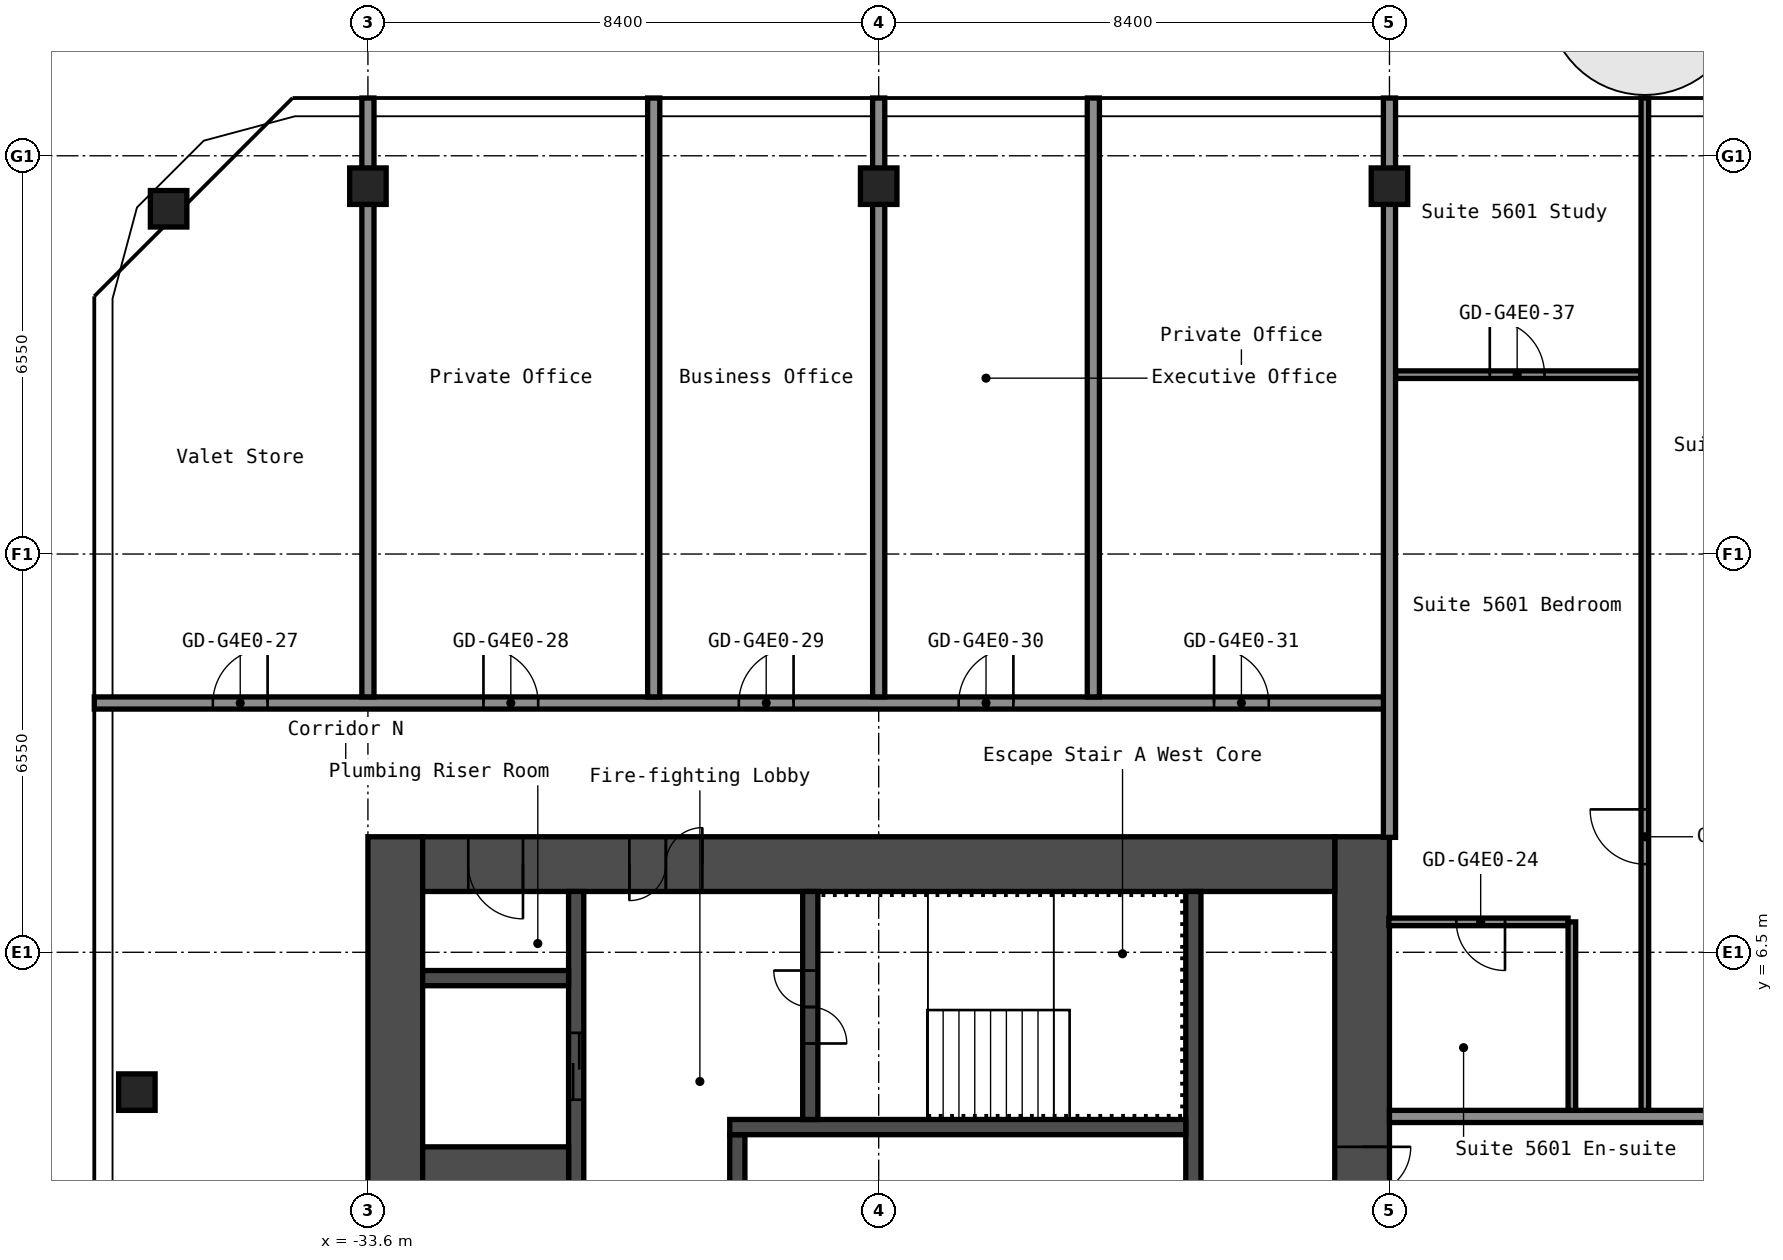
"""IFC4 building model, lengths in metres.
Left out: names, types, materials, properties, quantities, classifications, styles, units other than length and angle.
Written with IfcOpenShell. Run it as: python <this file> out.ifc"""

import sys

from ifc_helpers import new_model, si_unit, direction, frame, frame_2d, origin, origin_2d, place, context, subcontext, project, spatial, rectangle, hollow_rectangle, extrude, element, fill, save


model = new_model("IFC4")
c1 = context("Model", 3, precision=1e-05, world=origin(), true_north=direction((0.0, 1.0)))
c2 = subcontext(c1, "Body", "Model", "MODEL_VIEW")
j1 = project(units=[si_unit("LENGTHUNIT", "METRE"), si_unit("PLANEANGLEUNIT", "RADIAN")], contexts=[c1])
p1 = place(None, origin())
s1 = spatial("IfcSite", under=j1, at=p1, CompositionType="ELEMENT")
p2 = place(p1, origin())
s2 = spatial("IfcBuilding", under=s1, at=p2, CompositionType="ELEMENT")
p3 = place(p2, frame((0.0, 0.0, 199.4)))
s3 = spatial("IfcBuildingStorey", under=s2, at=p3, CompositionType="ELEMENT", Elevation=199.4)
for number, where, z_axis, x_axis in (
    (1, (-37.4, 4.2, 0.0), (0.0, 0.0, 1.0), (1.0, 0.0, 0.0)),
    (2, (-36.878, 18.729, 0.0), (0.0, 0.0, 1.0), (1.0, 0.0, 0.0)),
    (3, (-33.6, 19.1, 0.0), (0.0, 0.0, 1.0), (1.0, 0.0, 0.0)),
    (4, (-25.2, 19.1, 0.0), (0.0, 0.0, 1.0), (1.0, 0.0, 0.0)),
    (5, (-16.8, 19.1, 0.0), (0.0, 0.0, 1.0), (1.0, 0.0, 0.0)),
):
    element("IfcColumn", number, at=place(p3, frame(where, z_axis=z_axis, x_axis=x_axis)), inside=s3, PredefinedType="COLUMN", context=c2, shape_type="SweptSolid", body=[
        extrude(hollow_rectangle(XDim=0.6, YDim=0.6, WallThickness=0.025, InnerFilletRadius=0.038, OuterFilletRadius=0.062, at=origin_2d()), origin(), (0.0, 0.0, 1.0), 2.75),
    ])
p4 = place(p3, frame((-17.25, -8.4, 0.0), z_axis=(0.0, 0.0, 1.0), x_axis=(0.0, 1.0, 0.0)))
e6 = element("IfcWall", 6, at=p4, inside=s3, PredefinedType="SHEAR", context=c2, shape_type="SweptSolid", body=[
    extrude(rectangle(XDim=16.8, YDim=0.9, at=frame_2d((8.4, 0.0))), origin(), (0.0, 0.0, 1.0), 2.75),
])
p5 = place(p4, frame((10.1, 0.0, 0.0)))
e7 = element("IfcOpeningElement", 7, at=p5, cuts=e6, PredefinedType="OPENING", context=c2, shape_type="SweptSolid", body=[
    extrude(rectangle(XDim=1.6, YDim=2.1, at=frame_2d((0.8, 1.05))), frame((0.0, 0.46, 0.0), z_axis=(0.0, -1.0, 0.0), x_axis=(1.0, 0.0, 0.0)), (0.0, 0.0, 1.0), 0.92),
])
p6 = place(p3, frame((-33.15, -8.4, 0.0), z_axis=(0.0, 0.0, 1.0), x_axis=(0.0, 1.0, 0.0)))
e8 = element("IfcWall", 8, at=p6, inside=s3, PredefinedType="SHEAR", context=c2, shape_type="SweptSolid", body=[
    extrude(rectangle(XDim=16.8, YDim=0.9, at=frame_2d((8.4, 0.0))), origin(), (0.0, 0.0, 1.0), 2.75),
])
p7 = place(p3, frame((-32.7, 7.95, 0.0), z_axis=(0.0, 0.0, 1.0), x_axis=(1.0, 0.0, 0.0)))
e9 = element("IfcWall", 9, at=p7, inside=s3, PredefinedType="SHEAR", context=c2, shape_type="SweptSolid", body=[
    extrude(rectangle(XDim=15.0, YDim=0.9, at=frame_2d((7.5, 0.0))), origin(), (0.0, 0.0, 1.0), 2.75),
])
p8 = place(p7, frame((3.4, 0.0, 0.0)))
e10 = element("IfcOpeningElement", 10, at=p8, cuts=e9, PredefinedType="OPENING", context=c2, shape_type="SweptSolid", body=[
    extrude(rectangle(XDim=1.2, YDim=2.1, at=frame_2d((0.6, 1.05))), frame((0.0, 0.46, 0.0), z_axis=(0.0, -1.0, 0.0), x_axis=(1.0, 0.0, 0.0)), (0.0, 0.0, 1.0), 0.92),
])
p9 = place(p7, frame((0.75, 0.0, 0.0)))
e11 = element("IfcOpeningElement", 11, at=p9, cuts=e9, PredefinedType="OPENING", context=c2, shape_type="SweptSolid", body=[
    extrude(rectangle(XDim=0.9, YDim=2.1, at=frame_2d((0.45, 1.05))), frame((0.0, 0.46, 0.0), z_axis=(0.0, -1.0, 0.0), x_axis=(1.0, 0.0, 0.0)), (0.0, 0.0, 1.0), 0.92),
])
p10 = place(p3, frame((-20.025, 1.2, 0.0), z_axis=(0.0, 0.0, 1.0), x_axis=(0.0, 1.0, 0.0)))
e12 = element("IfcWall", 12, at=p10, inside=s3, PredefinedType="SHEAR", context=c2, shape_type="SweptSolid", body=[
    extrude(rectangle(XDim=6.3, YDim=0.25, at=frame_2d((3.15, 0.0))), origin(), (0.0, 0.0, 1.0), 2.75),
])
p11 = place(p3, frame((-27.525, 1.45, 0.0), z_axis=(0.0, 0.0, 1.0), x_axis=(0.0, 1.0, 0.0)))
e13 = element("IfcWall", 13, at=p11, inside=s3, PredefinedType="SHEAR", context=c2, shape_type="SweptSolid", body=[
    extrude(rectangle(XDim=2.05, YDim=0.25, at=frame_2d((1.025, 0.0))), origin(), (0.0, 0.0, 1.0), 2.75),
])
p12 = place(p3, frame((-27.65, 3.625, 0.0), z_axis=(0.0, 0.0, 1.0), x_axis=(1.0, 0.0, 0.0)))
e14 = element("IfcWall", 14, at=p12, inside=s3, PredefinedType="SHEAR", context=c2, shape_type="SweptSolid", body=[
    extrude(rectangle(XDim=7.5, YDim=0.25, at=frame_2d((3.75, 0.0))), origin(), (0.0, 0.0, 1.0), 2.75),
])
p13 = place(p3, frame((-26.325, 3.75, 0.0), z_axis=(0.0, 0.0, 1.0), x_axis=(0.0, 1.0, 0.0)))
e15 = element("IfcWall", 15, at=p13, inside=s3, PredefinedType="SHEAR", context=c2, shape_type="SweptSolid", body=[
    extrude(rectangle(XDim=3.75, YDim=0.25, at=frame_2d((1.875, 0.0))), origin(), (0.0, 0.0, 1.0), 2.75),
])
p14 = place(p13, frame((1.25, 0.0, 0.0)))
e16 = element("IfcOpeningElement", 16, at=p14, cuts=e15, PredefinedType="OPENING", context=c2, shape_type="SweptSolid", body=[
    extrude(rectangle(XDim=1.2, YDim=2.1, at=frame_2d((0.6, 1.05))), frame((0.0, 0.135, 0.0), z_axis=(0.0, -1.0, 0.0), x_axis=(1.0, 0.0, 0.0)), (0.0, 0.0, 1.0), 0.27),
])
p15 = place(p3, frame((-30.175, 1.45, 0.0), z_axis=(0.0, 0.0, 1.0), x_axis=(0.0, 1.0, 0.0)))
e17 = element("IfcWall", 17, at=p15, inside=s3, PredefinedType="SHEAR", context=c2, shape_type="SweptSolid", body=[
    extrude(rectangle(XDim=6.05, YDim=0.25, at=frame_2d((3.025, 0.0))), origin(), (0.0, 0.0, 1.0), 2.75),
])
p16 = place(p15, frame((2.625, 0.0, 0.0)))
e18 = element("IfcOpeningElement", 18, at=p16, cuts=e17, PredefinedType="OPENING", context=c2, shape_type="SweptSolid", body=[
    extrude(rectangle(XDim=1.1, YDim=2.1, at=frame_2d((0.55, 1.05))), frame((0.0, 0.135, 0.0), z_axis=(0.0, -1.0, 0.0), x_axis=(1.0, 0.0, 0.0)), (0.0, 0.0, 1.0), 0.27),
])
p17 = place(p3, frame((-32.7, 2.375, 0.0), z_axis=(0.0, 0.0, 1.0), x_axis=(1.0, 0.0, 0.0)))
e19 = element("IfcWall", 19, at=p17, inside=s3, PredefinedType="SHEAR", context=c2, shape_type="SweptSolid", body=[
    extrude(rectangle(XDim=2.4, YDim=1.85, at=frame_2d((1.2, 0.0))), origin(), (0.0, 0.0, 1.0), 2.75),
])
p18 = place(p3, frame((-32.7, 6.075, 0.0), z_axis=(0.0, 0.0, 1.0), x_axis=(1.0, 0.0, 0.0)))
e20 = element("IfcWall", 20, at=p18, inside=s3, PredefinedType="SHEAR", context=c2, shape_type="SweptSolid", body=[
    extrude(rectangle(XDim=2.4, YDim=0.25, at=frame_2d((1.2, 0.0))), origin(), (0.0, 0.0, 1.0), 2.75),
])
p19 = place(p3, frame((-16.8, 3.8, 0.0), z_axis=(0.0, 0.0, 1.0), x_axis=(1.0, 0.0, 0.0)))
e21 = element("IfcWall", 21, at=p19, inside=s3, PredefinedType="PARTITIONING", context=c2, shape_type="SweptSolid", body=[
    extrude(rectangle(XDim=33.6, YDim=0.2, at=frame_2d((16.8, 0.0))), origin(), (0.0, 0.0, 1.0), 2.75),
])
p20 = place(p19, frame((5.8, 0.0, 0.0)))
e22 = element("IfcOpeningElement", 22, at=p20, cuts=e21, PredefinedType="OPENING", context=c2, shape_type="SweptSolid", body=[
    extrude(rectangle(XDim=1.0, YDim=2.1, at=frame_2d((0.5, 1.05))), frame((0.0, 0.11, 0.0), z_axis=(0.0, -1.0, 0.0), x_axis=(1.0, 0.0, 0.0)), (0.0, 0.0, 1.0), 0.22),
])
p21 = place(p19, frame((10.3, 0.0, 0.0)))
e23 = element("IfcOpeningElement", 23, at=p21, cuts=e21, PredefinedType="OPENING", context=c2, shape_type="SweptSolid", body=[
    extrude(rectangle(XDim=1.0, YDim=2.1, at=frame_2d((0.5, 1.05))), frame((0.0, 0.11, 0.0), z_axis=(0.0, -1.0, 0.0), x_axis=(1.0, 0.0, 0.0)), (0.0, 0.0, 1.0), 0.22),
])
p22 = place(p19, frame((22.6, 0.0, 0.0)))
e24 = element("IfcOpeningElement", 24, at=p22, cuts=e21, PredefinedType="OPENING", context=c2, shape_type="SweptSolid", body=[
    extrude(rectangle(XDim=1.0, YDim=2.1, at=frame_2d((0.5, 1.05))), frame((0.0, 0.11, 0.0), z_axis=(0.0, -1.0, 0.0), x_axis=(1.0, 0.0, 0.0)), (0.0, 0.0, 1.0), 0.22),
])
p23 = place(p19, frame((31.0, 0.0, 0.0)))
e25 = element("IfcOpeningElement", 25, at=p23, cuts=e21, PredefinedType="OPENING", context=c2, shape_type="SweptSolid", body=[
    extrude(rectangle(XDim=1.0, YDim=2.1, at=frame_2d((0.5, 1.05))), frame((0.0, 0.11, 0.0), z_axis=(0.0, -1.0, 0.0), x_axis=(1.0, 0.0, 0.0)), (0.0, 0.0, 1.0), 0.22),
])
p24 = place(p3, frame((-16.81, 7.0, 0.0), z_axis=(0.0, 0.0, 1.0), x_axis=(1.0, 0.0, 0.0)))
e26 = element("IfcWall", 26, at=p24, inside=s3, PredefinedType="PARTITIONING", context=c2, shape_type="SweptSolid", body=[
    extrude(rectangle(XDim=2.948, YDim=0.125, at=frame_2d((1.474, 0.0))), origin(), (0.0, 0.0, 1.0), 2.75),
])
p25 = place(p24, frame((1.11, 0.0, 0.0)))
e27 = element("IfcOpeningElement", 27, at=p25, cuts=e26, PredefinedType="OPENING", context=c2, shape_type="SweptSolid", body=[
    extrude(rectangle(XDim=0.8, YDim=2.1, at=frame_2d((0.4, 1.05))), frame((0.0, 0.073, 0.0), z_axis=(0.0, -1.0, 0.0), x_axis=(1.0, 0.0, 0.0)), (0.0, 0.0, 1.0), 0.145),
])
p26 = place(p3, frame((-38.1, 10.6, 0.0), z_axis=(0.0, 0.0, 1.0), x_axis=(1.0, 0.0, 0.0)))
e28 = element("IfcWall", 28, at=p26, inside=s3, PredefinedType="PARTITIONING", context=c2, shape_type="SweptSolid", body=[
    extrude(rectangle(XDim=21.3, YDim=0.2, at=frame_2d((10.65, 0.0))), origin(), (0.0, 0.0, 1.0), 2.75),
])
p27 = place(p26, frame((1.95, 0.0, 0.0)))
e29 = element("IfcOpeningElement", 29, at=p27, cuts=e28, PredefinedType="OPENING", context=c2, shape_type="SweptSolid", body=[
    extrude(rectangle(XDim=0.9, YDim=2.1, at=frame_2d((0.45, 1.05))), frame((0.0, 0.11, 0.0), z_axis=(0.0, -1.0, 0.0), x_axis=(1.0, 0.0, 0.0)), (0.0, 0.0, 1.0), 0.22),
])
p28 = place(p26, frame((6.4, 0.0, 0.0)))
e30 = element("IfcOpeningElement", 30, at=p28, cuts=e28, PredefinedType="OPENING", context=c2, shape_type="SweptSolid", body=[
    extrude(rectangle(XDim=0.9, YDim=2.1, at=frame_2d((0.45, 1.05))), frame((0.0, 0.11, 0.0), z_axis=(0.0, -1.0, 0.0), x_axis=(1.0, 0.0, 0.0)), (0.0, 0.0, 1.0), 0.22),
])
p29 = place(p26, frame((10.6, 0.0, 0.0)))
e31 = element("IfcOpeningElement", 31, at=p29, cuts=e28, PredefinedType="OPENING", context=c2, shape_type="SweptSolid", body=[
    extrude(rectangle(XDim=0.9, YDim=2.1, at=frame_2d((0.45, 1.05))), frame((0.0, 0.11, 0.0), z_axis=(0.0, -1.0, 0.0), x_axis=(1.0, 0.0, 0.0)), (0.0, 0.0, 1.0), 0.22),
])
p30 = place(p26, frame((14.215, 0.0, 0.0)))
e32 = element("IfcOpeningElement", 32, at=p30, cuts=e28, PredefinedType="OPENING", context=c2, shape_type="SweptSolid", body=[
    extrude(rectangle(XDim=0.9, YDim=2.1, at=frame_2d((0.45, 1.05))), frame((0.0, 0.11, 0.0), z_axis=(0.0, -1.0, 0.0), x_axis=(1.0, 0.0, 0.0)), (0.0, 0.0, 1.0), 0.22),
])
p31 = place(p26, frame((18.415, 0.0, 0.0)))
e33 = element("IfcOpeningElement", 33, at=p31, cuts=e28, PredefinedType="OPENING", context=c2, shape_type="SweptSolid", body=[
    extrude(rectangle(XDim=0.9, YDim=2.1, at=frame_2d((0.45, 1.05))), frame((0.0, 0.11, 0.0), z_axis=(0.0, -1.0, 0.0), x_axis=(1.0, 0.0, 0.0)), (0.0, 0.0, 1.0), 0.22),
])
p32 = place(p3, frame((-16.7, 16.0, 0.0), z_axis=(0.0, 0.0, 1.0), x_axis=(1.0, 0.0, 0.0)))
e34 = element("IfcWall", 34, at=p32, inside=s3, PredefinedType="PARTITIONING", context=c2, shape_type="SweptSolid", body=[
    extrude(rectangle(XDim=4.037, YDim=0.125, at=frame_2d((2.019, 0.0))), origin(), (0.0, 0.0, 1.0), 2.75),
])
p33 = place(p32, frame((1.55, 0.0, 0.0)))
e35 = element("IfcOpeningElement", 35, at=p33, cuts=e34, PredefinedType="OPENING", context=c2, shape_type="SweptSolid", body=[
    extrude(rectangle(XDim=0.9, YDim=2.1, at=frame_2d((0.45, 1.05))), frame((0.0, 0.073, 0.0), z_axis=(0.0, -1.0, 0.0), x_axis=(1.0, 0.0, 0.0)), (0.0, 0.0, 1.0), 0.145),
])
for number, where, z_axis, x_axis in (
    (36, (-33.6, 10.7, 0.0), (0.0, 0.0, 1.0), (0.0, 1.0, 0.0)),
    (37, (-28.9, 10.7, 0.0), (0.0, 0.0, 1.0), (0.0, 1.0, 0.0)),
    (38, (-25.2, 10.7, 0.0), (0.0, 0.0, 1.0), (0.0, 1.0, 0.0)),
    (39, (-21.67, 10.7, 0.0), (0.0, 0.0, 1.0), (0.0, 1.0, 0.0)),
):
    element("IfcWall", number, at=place(p3, frame(where, z_axis=z_axis, x_axis=x_axis)), inside=s3, PredefinedType="PARTITIONING", context=c2, shape_type="SweptSolid", body=[
        extrude(rectangle(XDim=9.85, YDim=0.2, at=frame_2d((4.925, 0.0))), origin(), (0.0, 0.0, 1.0), 2.75),
    ])
p34 = place(p3, frame((-16.8, 8.39, 0.0), z_axis=(0.0, 0.0, 1.0), x_axis=(0.0, 1.0, 0.0)))
e40 = element("IfcWall", 40, at=p34, inside=s3, PredefinedType="PARTITIONING", context=c2, shape_type="SweptSolid", body=[
    extrude(rectangle(XDim=12.16, YDim=0.2, at=frame_2d((6.08, 0.0))), origin(), (0.0, 0.0, 1.0), 2.75),
])
p35 = place(p3, frame((-13.8, 3.9, 0.0), z_axis=(0.0, 0.0, 1.0), x_axis=(0.0, 1.0, 0.0)))
e41 = element("IfcWall", 41, at=p35, inside=s3, PredefinedType="PARTITIONING", context=c2, shape_type="SweptSolid", body=[
    extrude(rectangle(XDim=3.1, YDim=0.125, at=frame_2d((1.55, 0.0))), origin(), (0.0, 0.0, 1.0), 2.75),
])
p36 = place(p3, frame((-12.6, 3.9, 0.0), z_axis=(0.0, 0.0, 1.0), x_axis=(0.0, 1.0, 0.0)))
e42 = element("IfcWall", 42, at=p36, inside=s3, PredefinedType="PARTITIONING", context=c2, shape_type="SweptSolid", body=[
    extrude(rectangle(XDim=16.65, YDim=0.125, at=frame_2d((8.325, 0.0))), origin(), (0.0, 0.0, 1.0), 2.75),
])
p37 = place(p36, frame((4.05, 0.0, 0.0)))
e43 = element("IfcOpeningElement", 43, at=p37, cuts=e42, PredefinedType="OPENING", context=c2, shape_type="SweptSolid", body=[
    extrude(rectangle(XDim=0.9, YDim=2.1, at=frame_2d((0.45, 1.05))), frame((0.0, 0.073, 0.0), z_axis=(0.0, -1.0, 0.0), x_axis=(1.0, 0.0, 0.0)), (0.0, 0.0, 1.0), 0.145),
])
p38 = place(p5, origin())
e44 = element("IfcDoor", 44, at=p38, inside=s3, OperationType="DOUBLE_DOOR_SINGLE_SWING", PredefinedType="DOOR", context=c2, shape_type="SweptSolid", body=[
    extrude(rectangle(XDim=1.6, YDim=2.1, at=frame_2d((0.8, 1.05))), frame((0.0, 0.025, 0.0), z_axis=(0.0, -1.0, 0.0), x_axis=(1.0, 0.0, 0.0)), (0.0, 0.0, 1.0), 0.05),
])
fill(e7, e44)
p39 = place(p8, origin())
e45 = element("IfcDoor", 45, at=p39, inside=s3, OperationType="DOUBLE_DOOR_SINGLE_SWING", PredefinedType="DOOR", context=c2, shape_type="SweptSolid", body=[
    extrude(rectangle(XDim=1.2, YDim=2.1, at=frame_2d((0.6, 1.05))), frame((0.0, 0.025, 0.0), z_axis=(0.0, -1.0, 0.0), x_axis=(1.0, 0.0, 0.0)), (0.0, 0.0, 1.0), 0.05),
])
fill(e10, e45)
p40 = place(p9, origin())
e46 = element("IfcDoor", 46, at=p40, inside=s3, OperationType="SINGLE_SWING_RIGHT", PredefinedType="DOOR", context=c2, shape_type="SweptSolid", body=[
    extrude(rectangle(XDim=0.9, YDim=2.1, at=frame_2d((0.45, 1.05))), frame((0.0, 0.025, 0.0), z_axis=(0.0, -1.0, 0.0), x_axis=(1.0, 0.0, 0.0)), (0.0, 0.0, 1.0), 0.05),
])
fill(e11, e46)
p41 = place(p14, origin())
e47 = element("IfcDoor", 47, at=p41, inside=s3, OperationType="DOUBLE_DOOR_SINGLE_SWING", PredefinedType="DOOR", context=c2, shape_type="SweptSolid", body=[
    extrude(rectangle(XDim=1.2, YDim=2.1, at=frame_2d((0.6, 1.05))), frame((0.0, 0.025, 0.0), z_axis=(0.0, -1.0, 0.0), x_axis=(1.0, 0.0, 0.0)), (0.0, 0.0, 1.0), 0.05),
])
fill(e16, e47)
p42 = place(p16, origin())
e48 = element("IfcDoor", 48, at=p42, inside=s3, OperationType="DOUBLE_DOOR_SLIDING", PredefinedType="DOOR", context=c2, shape_type="SweptSolid", body=[
    extrude(rectangle(XDim=1.1, YDim=2.1, at=frame_2d((0.55, 1.05))), frame((0.0, 0.025, 0.0), z_axis=(0.0, -1.0, 0.0), x_axis=(1.0, 0.0, 0.0)), (0.0, 0.0, 1.0), 0.05),
])
fill(e18, e48)
p43 = place(p25, origin())
e49 = element("IfcDoor", 49, at=p43, inside=s3, OperationType="SINGLE_SWING_RIGHT", PredefinedType="DOOR", context=c2, shape_type="SweptSolid", body=[
    extrude(rectangle(XDim=0.8, YDim=2.1, at=frame_2d((0.4, 1.05))), frame((0.0, 0.025, 0.0), z_axis=(0.0, -1.0, 0.0), x_axis=(1.0, 0.0, 0.0)), (0.0, 0.0, 1.0), 0.05),
])
fill(e27, e49)
p44 = place(p27, origin())
e50 = element("IfcDoor", 50, at=p44, inside=s3, OperationType="SINGLE_SWING_LEFT", PredefinedType="DOOR", context=c2, shape_type="SweptSolid", body=[
    extrude(rectangle(XDim=0.9, YDim=2.1, at=frame_2d((0.45, 1.05))), frame((0.0, 0.025, 0.0), z_axis=(0.0, -1.0, 0.0), x_axis=(1.0, 0.0, 0.0)), (0.0, 0.0, 1.0), 0.05),
])
fill(e29, e50)
p45 = place(p28, origin())
e51 = element("IfcDoor", 51, at=p45, inside=s3, OperationType="SINGLE_SWING_RIGHT", PredefinedType="DOOR", context=c2, shape_type="SweptSolid", body=[
    extrude(rectangle(XDim=0.9, YDim=2.1, at=frame_2d((0.45, 1.05))), frame((0.0, 0.025, 0.0), z_axis=(0.0, -1.0, 0.0), x_axis=(1.0, 0.0, 0.0)), (0.0, 0.0, 1.0), 0.05),
])
fill(e30, e51)
p46 = place(p29, origin())
e52 = element("IfcDoor", 52, at=p46, inside=s3, OperationType="SINGLE_SWING_LEFT", PredefinedType="DOOR", context=c2, shape_type="SweptSolid", body=[
    extrude(rectangle(XDim=0.9, YDim=2.1, at=frame_2d((0.45, 1.05))), frame((0.0, 0.025, 0.0), z_axis=(0.0, -1.0, 0.0), x_axis=(1.0, 0.0, 0.0)), (0.0, 0.0, 1.0), 0.05),
])
fill(e31, e52)
p47 = place(p30, origin())
e53 = element("IfcDoor", 53, at=p47, inside=s3, OperationType="SINGLE_SWING_LEFT", PredefinedType="DOOR", context=c2, shape_type="SweptSolid", body=[
    extrude(rectangle(XDim=0.9, YDim=2.1, at=frame_2d((0.45, 1.05))), frame((0.0, 0.025, 0.0), z_axis=(0.0, -1.0, 0.0), x_axis=(1.0, 0.0, 0.0)), (0.0, 0.0, 1.0), 0.05),
])
fill(e32, e53)
p48 = place(p31, origin())
e54 = element("IfcDoor", 54, at=p48, inside=s3, OperationType="SINGLE_SWING_RIGHT", PredefinedType="DOOR", context=c2, shape_type="SweptSolid", body=[
    extrude(rectangle(XDim=0.9, YDim=2.1, at=frame_2d((0.45, 1.05))), frame((0.0, 0.025, 0.0), z_axis=(0.0, -1.0, 0.0), x_axis=(1.0, 0.0, 0.0)), (0.0, 0.0, 1.0), 0.05),
])
fill(e33, e54)
p49 = place(p33, origin())
e55 = element("IfcDoor", 55, at=p49, inside=s3, OperationType="SINGLE_SWING_RIGHT", PredefinedType="DOOR", context=c2, shape_type="SweptSolid", body=[
    extrude(rectangle(XDim=0.9, YDim=2.1, at=frame_2d((0.45, 1.05))), frame((0.0, 0.025, 0.0), z_axis=(0.0, -1.0, 0.0), x_axis=(1.0, 0.0, 0.0)), (0.0, 0.0, 1.0), 0.05),
])
fill(e35, e55)
p50 = place(p37, origin())
e56 = element("IfcDoor", 56, at=p50, inside=s3, OperationType="SINGLE_SWING_LEFT", PredefinedType="DOOR", context=c2, shape_type="SweptSolid", body=[
    extrude(rectangle(XDim=0.9, YDim=2.1, at=frame_2d((0.45, 1.05))), frame((0.0, 0.025, 0.0), z_axis=(0.0, -1.0, 0.0), x_axis=(1.0, 0.0, 0.0)), (0.0, 0.0, 1.0), 0.05),
])
fill(e43, e56)
save(model, sys.argv[1])
